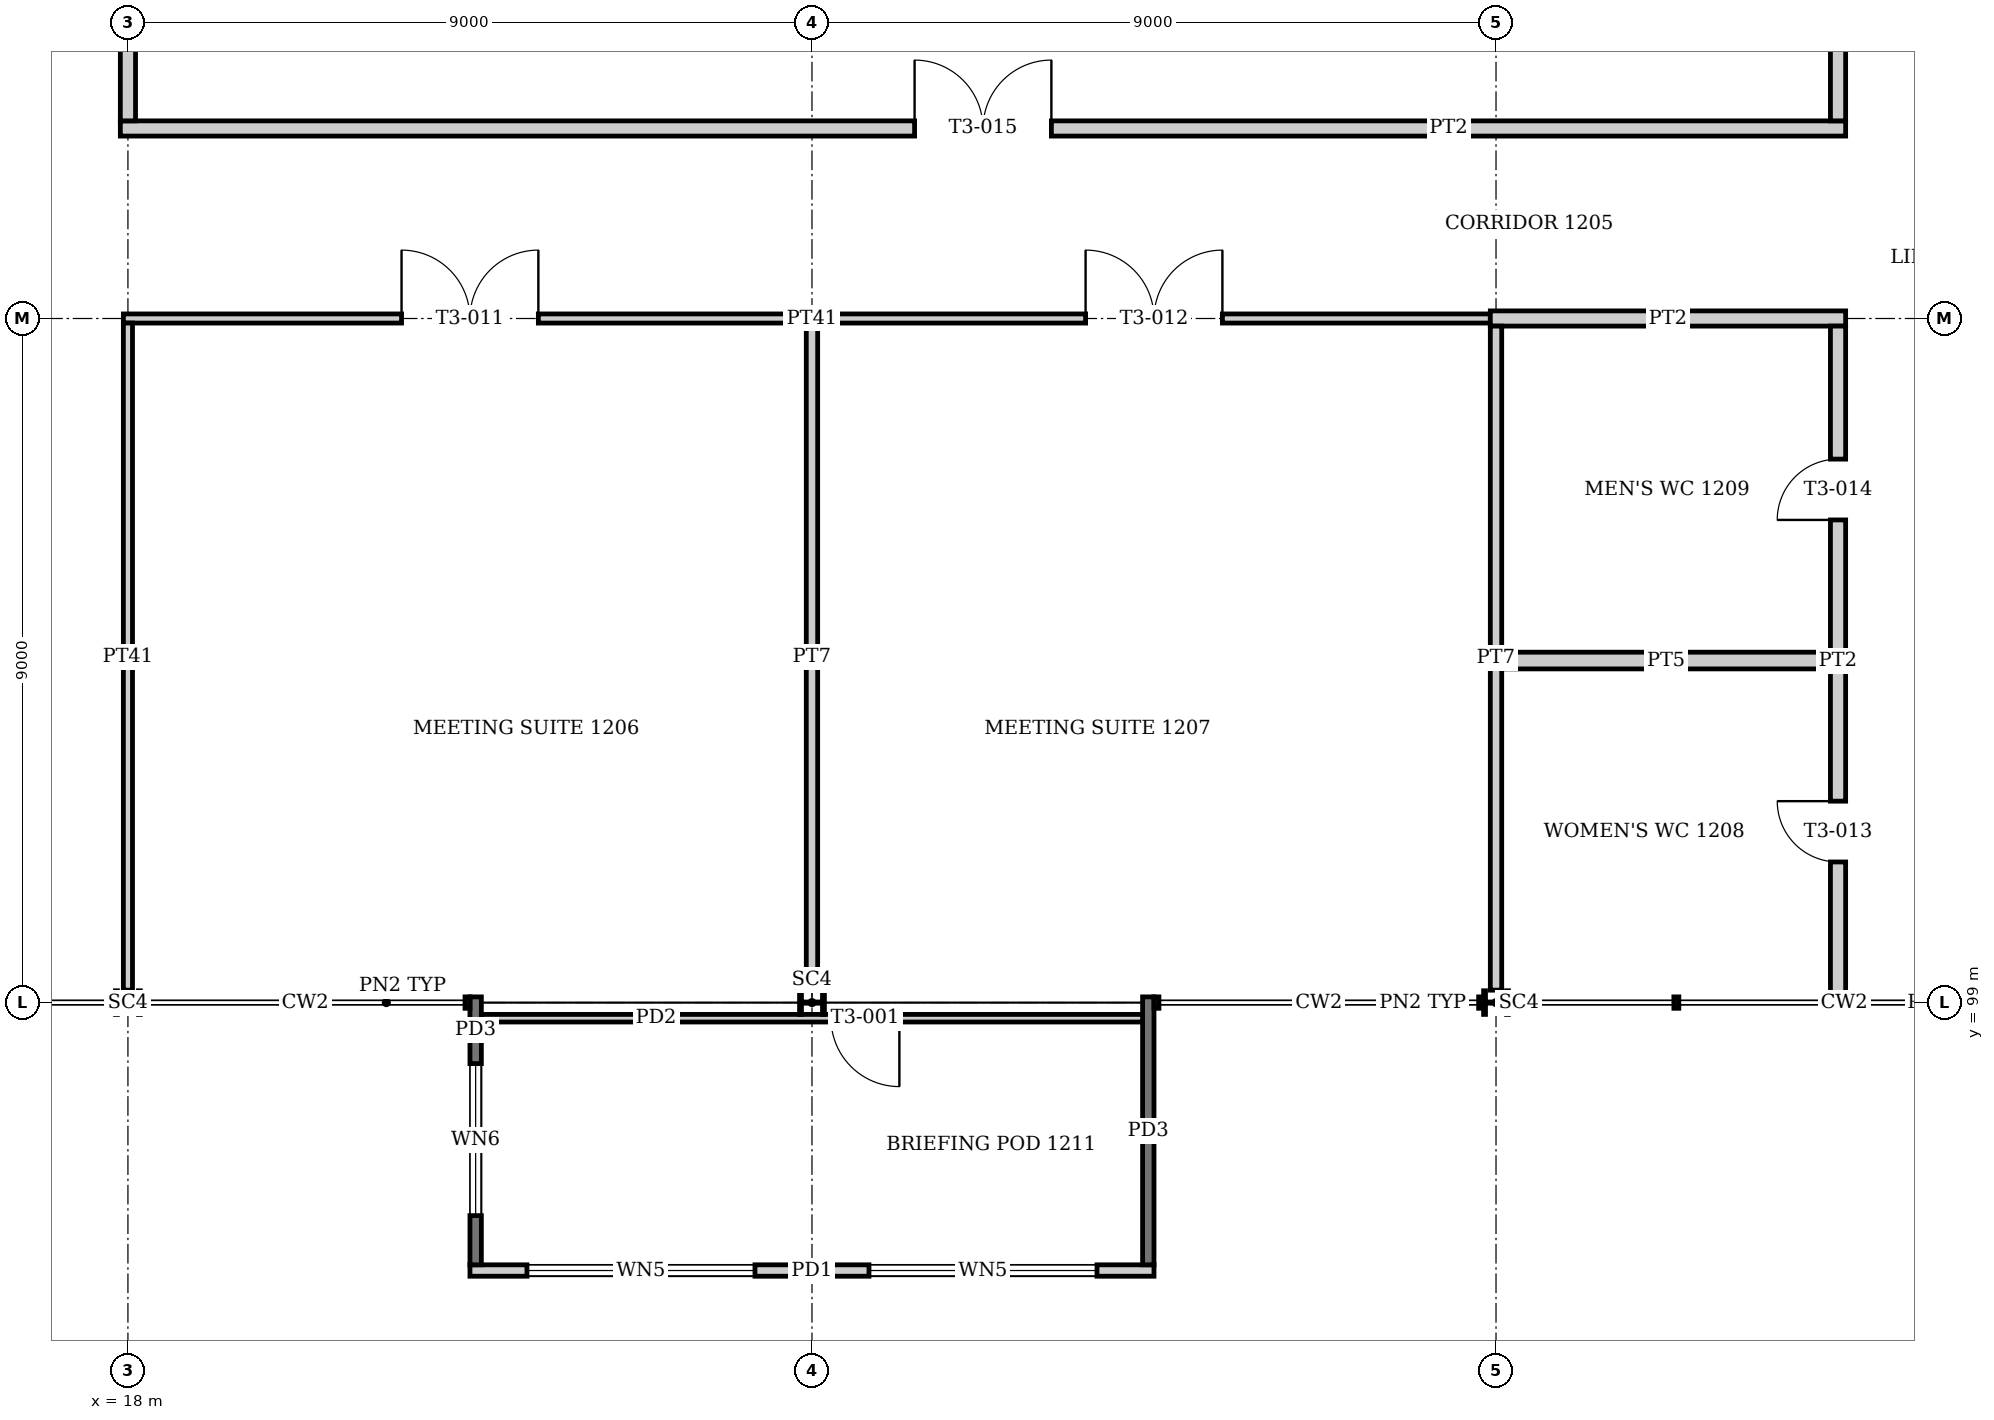
"""IFC4 building model, lengths in metres.
Left out: names, types, materials, properties, quantities, classifications, styles, units other than length and angle.
Written with IfcOpenShell. Run it as: python <this file> out.ifc"""

import sys

from ifc_helpers import new_model, si_unit, direction, frame, frame_2d, origin, origin_2d, place, context, subcontext, project, spatial, rectangle, i_section, extrude, element, fill, save


model = new_model("IFC4")
c1 = context("Model", 3, precision=1e-05, world=origin(), true_north=direction((0.0, 1.0)))
c2 = subcontext(c1, "Body", "Model", "MODEL_VIEW")
j1 = project(units=[si_unit("LENGTHUNIT", "METRE"), si_unit("PLANEANGLEUNIT", "RADIAN")], contexts=[c1])
p1 = place(None, origin())
s1 = spatial("IfcSite", under=j1, at=p1, CompositionType="ELEMENT")
p2 = place(p1, origin())
s2 = spatial("IfcBuilding", under=s1, at=p2, CompositionType="ELEMENT")
p3 = place(p2, frame((0.0, 0.0, 51.2)))
s3 = spatial("IfcBuildingStorey", under=s2, at=p3, CompositionType="ELEMENT", Elevation=51.2)
for number, where, z_axis, x_axis in (
    (1, (18.0, 99.0, 0.0), (0.0, 0.0, 1.0), (0.0, 1.0, 0.0)),
    (2, (27.0, 99.0, 0.0), (0.0, 0.0, 1.0), (0.0, 1.0, 0.0)),
    (3, (36.0, 99.0, 0.0), (0.0, 0.0, 1.0), (0.0, 1.0, 0.0)),
):
    element("IfcColumn", number, at=place(p3, frame(where, z_axis=z_axis, x_axis=x_axis)), inside=s3, PredefinedType="COLUMN", context=c2, shape_type="SweptSolid", body=[
        extrude(i_section(OverallWidth=0.311, OverallDepth=0.327, WebThickness=0.016, FlangeThickness=0.025, at=origin_2d()), origin(), (0.0, 0.0, 1.0), 4.0),
    ])
p4 = place(p3, frame((22.5, 95.475, 0.0), z_axis=(0.0, 0.0, 1.0), x_axis=(1.0, 0.0, 0.0)))
e4 = element("IfcWall", 4, at=p4, inside=s3, PredefinedType="SOLIDWALL", context=c2, shape_type="SweptSolid", body=[
    extrude(rectangle(XDim=9.0, YDim=0.15, at=frame_2d((4.5, 0.0))), origin(), (0.0, 0.0, 1.0), 2.6),
])
p5 = place(p4, frame((0.75, 0.0, 0.9)))
e5 = element("IfcOpeningElement", 5, at=p5, cuts=e4, PredefinedType="OPENING", context=c2, shape_type="SweptSolid", body=[
    extrude(rectangle(XDim=3.0, YDim=1.4, at=frame_2d((1.5, 0.7))), frame((0.0, 0.085, 0.0), z_axis=(0.0, -1.0, 0.0), x_axis=(1.0, 0.0, 0.0)), (0.0, 0.0, 1.0), 0.17),
])
p6 = place(p4, frame((5.25, 0.0, 0.9)))
e6 = element("IfcOpeningElement", 6, at=p6, cuts=e4, PredefinedType="OPENING", context=c2, shape_type="SweptSolid", body=[
    extrude(rectangle(XDim=3.0, YDim=1.4, at=frame_2d((1.5, 0.7))), frame((0.0, 0.085, 0.0), z_axis=(0.0, -1.0, 0.0), x_axis=(1.0, 0.0, 0.0)), (0.0, 0.0, 1.0), 0.17),
])
p7 = place(p3, frame((22.575, 95.55, -0.15), z_axis=(0.0, 0.0, 1.0), x_axis=(0.0, 1.0, 0.0)))
e7 = element("IfcWall", 7, at=p7, inside=s3, PredefinedType="SOLIDWALL", context=c2, shape_type="SweptSolid", body=[
    extrude(rectangle(XDim=3.525, YDim=0.15, at=frame_2d((1.762, 0.0))), origin(), (0.0, 0.0, 1.0), 2.75),
])
p8 = place(p7, frame((0.647, 0.0, 1.05)))
e8 = element("IfcOpeningElement", 8, at=p8, cuts=e7, PredefinedType="OPENING", context=c2, shape_type="SweptSolid", body=[
    extrude(rectangle(XDim=2.0, YDim=1.4, at=frame_2d((1.0, 0.7))), frame((0.0, 0.085, 0.0), z_axis=(0.0, -1.0, 0.0), x_axis=(1.0, 0.0, 0.0)), (0.0, 0.0, 1.0), 0.17),
])
p9 = place(p3, frame((31.425, 95.55, -0.15), z_axis=(0.0, 0.0, 1.0), x_axis=(0.0, 1.0, 0.0)))
e9 = element("IfcWall", 9, at=p9, inside=s3, PredefinedType="SOLIDWALL", context=c2, shape_type="SweptSolid", body=[
    extrude(rectangle(XDim=3.525, YDim=0.15, at=frame_2d((1.762, 0.0))), origin(), (0.0, 0.0, 1.0), 2.75),
])
p10 = place(p3, frame((22.65, 98.794, 0.0), z_axis=(0.0, 0.0, 1.0), x_axis=(1.0, 0.0, 0.0)))
e10 = element("IfcWall", 10, at=p10, inside=s3, PredefinedType="PARTITIONING", context=c2, shape_type="SweptSolid", body=[
    extrude(rectangle(XDim=8.7, YDim=0.1, at=frame_2d((4.35, 0.0))), origin(), (0.0, 0.0, 1.0), 2.6),
])
p11 = place(p10, frame((4.6, 0.0, 0.0)))
e11 = element("IfcOpeningElement", 11, at=p11, cuts=e10, PredefinedType="OPENING", context=c2, shape_type="SweptSolid", body=[
    extrude(rectangle(XDim=0.9, YDim=2.1, at=frame_2d((0.45, 1.05))), frame((0.0, 0.06, 0.0), z_axis=(0.0, -1.0, 0.0), x_axis=(1.0, 0.0, 0.0)), (0.0, 0.0, 1.0), 0.12),
])
p12 = place(p3, frame((36.075, 103.5, 0.0), z_axis=(0.0, 0.0, 1.0), x_axis=(1.0, 0.0, 0.0)))
e12 = element("IfcWall", 12, at=p12, inside=s3, PredefinedType="PLUMBINGWALL", context=c2, shape_type="SweptSolid", body=[
    extrude(rectangle(XDim=4.325, YDim=0.22, at=frame_2d((2.163, 0.0))), origin(), (0.0, 0.0, 1.0), 3.05),
])
p13 = place(p3, frame((17.94, 108.0, 0.0), z_axis=(0.0, 0.0, 1.0), x_axis=(1.0, 0.0, 0.0)))
e13 = element("IfcWall", 13, at=p13, inside=s3, PredefinedType="PARTITIONING", context=c2, shape_type="SweptSolid", body=[
    extrude(rectangle(XDim=17.985, YDim=0.12, at=frame_2d((8.993, 0.0))), origin(), (0.0, 0.0, 1.0), 3.05),
])
p14 = place(p13, frame((3.66, 0.0, 0.0)))
e14 = element("IfcOpeningElement", 14, at=p14, cuts=e13, PredefinedType="OPENING", context=c2, shape_type="SweptSolid", body=[
    extrude(rectangle(XDim=1.8, YDim=2.1, at=frame_2d((0.9, 1.05))), frame((0.0, 0.07, 0.0), z_axis=(0.0, -1.0, 0.0), x_axis=(1.0, 0.0, 0.0)), (0.0, 0.0, 1.0), 0.14),
])
p15 = place(p13, frame((12.66, 0.0, 0.0)))
e15 = element("IfcOpeningElement", 15, at=p15, cuts=e13, PredefinedType="OPENING", context=c2, shape_type="SweptSolid", body=[
    extrude(rectangle(XDim=1.8, YDim=2.1, at=frame_2d((0.9, 1.05))), frame((0.0, 0.07, 0.0), z_axis=(0.0, -1.0, 0.0), x_axis=(1.0, 0.0, 0.0)), (0.0, 0.0, 1.0), 0.14),
])
p16 = place(p3, frame((35.925, 108.0, 0.0), z_axis=(0.0, 0.0, 1.0), x_axis=(1.0, 0.0, 0.0)))
e16 = element("IfcWall", 16, at=p16, inside=s3, PredefinedType="PARTITIONING", context=c2, shape_type="SweptSolid", body=[
    extrude(rectangle(XDim=4.675, YDim=0.2, at=frame_2d((2.337, 0.0))), origin(), (0.0, 0.0, 1.0), 3.05),
])
p17 = place(p3, frame((17.9, 110.5, 0.0), z_axis=(0.0, 0.0, 1.0), x_axis=(1.0, 0.0, 0.0)))
e17 = element("IfcWall", 17, at=p17, inside=s3, PredefinedType="PARTITIONING", context=c2, shape_type="SweptSolid", body=[
    extrude(rectangle(XDim=22.7, YDim=0.2, at=frame_2d((11.35, 0.0))), origin(), (0.0, 0.0, 1.0), 3.05),
])
p18 = place(p17, frame((10.45, 0.0, 0.0)))
e18 = element("IfcOpeningElement", 18, at=p18, cuts=e17, PredefinedType="OPENING", context=c2, shape_type="SweptSolid", body=[
    extrude(rectangle(XDim=1.8, YDim=2.1, at=frame_2d((0.9, 1.05))), frame((0.0, 0.11, 0.0), z_axis=(0.0, -1.0, 0.0), x_axis=(1.0, 0.0, 0.0)), (0.0, 0.0, 1.0), 0.22),
])
p19 = place(p3, frame((18.0, 99.164, 0.0), z_axis=(0.0, 0.0, 1.0), x_axis=(0.0, 1.0, 0.0)))
e19 = element("IfcWall", 19, at=p19, inside=s3, PredefinedType="PARTITIONING", context=c2, shape_type="SweptSolid", body=[
    extrude(rectangle(XDim=8.776, YDim=0.12, at=frame_2d((4.388, 0.0))), origin(), (0.0, 0.0, 1.0), 3.05),
])
p20 = place(p3, frame((18.0, 110.6, 0.0), z_axis=(0.0, 0.0, 1.0), x_axis=(0.0, 1.0, 0.0)))
e20 = element("IfcWall", 20, at=p20, inside=s3, PredefinedType="PARTITIONING", context=c2, shape_type="SweptSolid", body=[
    extrude(rectangle(XDim=6.236, YDim=0.2, at=frame_2d((3.118, 0.0))), origin(), (0.0, 0.0, 1.0), 3.05),
])
p21 = place(p20, frame((3.25, 0.0, 0.0)))
e21 = element("IfcOpeningElement", 21, at=p21, cuts=e20, PredefinedType="OPENING", context=c2, shape_type="SweptSolid", body=[
    extrude(rectangle(XDim=1.8, YDim=2.1, at=frame_2d((0.9, 1.05))), frame((0.0, 0.11, 0.0), z_axis=(0.0, -1.0, 0.0), x_axis=(1.0, 0.0, 0.0)), (0.0, 0.0, 1.0), 0.22),
])
p22 = place(p3, frame((27.0, 99.164, 0.0), z_axis=(0.0, 0.0, 1.0), x_axis=(0.0, 1.0, 0.0)))
e22 = element("IfcWall", 22, at=p22, inside=s3, PredefinedType="PARTITIONING", context=c2, shape_type="SweptSolid", body=[
    extrude(rectangle(XDim=8.776, YDim=0.15, at=frame_2d((4.388, 0.0))), origin(), (0.0, 0.0, 1.0), 3.05),
])
p23 = place(p3, frame((36.0, 99.164, 0.0), z_axis=(0.0, 0.0, 1.0), x_axis=(0.0, 1.0, 0.0)))
e23 = element("IfcWall", 23, at=p23, inside=s3, PredefinedType="PARTITIONING", context=c2, shape_type="SweptSolid", body=[
    extrude(rectangle(XDim=8.736, YDim=0.15, at=frame_2d((4.368, 0.0))), origin(), (0.0, 0.0, 1.0), 3.05),
])
p24 = place(p3, frame((40.5, 99.075, 0.0), z_axis=(0.0, 0.0, 1.0), x_axis=(0.0, 1.0, 0.0)))
e24 = element("IfcWall", 24, at=p24, inside=s3, PredefinedType="PARTITIONING", context=c2, shape_type="SweptSolid", body=[
    extrude(rectangle(XDim=8.825, YDim=0.2, at=frame_2d((4.413, 0.0))), origin(), (0.0, 0.0, 1.0), 3.05),
])
p25 = place(p24, frame((1.775, 0.0, 0.0)))
e25 = element("IfcOpeningElement", 25, at=p25, cuts=e24, PredefinedType="OPENING", context=c2, shape_type="SweptSolid", body=[
    extrude(rectangle(XDim=0.8, YDim=2.1, at=frame_2d((0.4, 1.05))), frame((0.0, 0.11, 0.0), z_axis=(0.0, -1.0, 0.0), x_axis=(1.0, 0.0, 0.0)), (0.0, 0.0, 1.0), 0.22),
])
p26 = place(p24, frame((6.275, 0.0, 0.0)))
e26 = element("IfcOpeningElement", 26, at=p26, cuts=e24, PredefinedType="OPENING", context=c2, shape_type="SweptSolid", body=[
    extrude(rectangle(XDim=0.8, YDim=2.1, at=frame_2d((0.4, 1.05))), frame((0.0, 0.11, 0.0), z_axis=(0.0, -1.0, 0.0), x_axis=(1.0, 0.0, 0.0)), (0.0, 0.0, 1.0), 0.22),
])
p27 = place(p3, frame((40.5, 110.6, 0.0), z_axis=(0.0, 0.0, 1.0), x_axis=(0.0, 1.0, 0.0)))
e27 = element("IfcWall", 27, at=p27, inside=s3, PredefinedType="PARTITIONING", context=c2, shape_type="SweptSolid", body=[
    extrude(rectangle(XDim=6.31, YDim=0.2, at=frame_2d((3.155, 0.0))), origin(), (0.0, 0.0, 1.0), 3.05),
])
p28 = place(p5, origin())
e28 = element("IfcWindow", 28, at=p28, inside=s3, PartitioningType="SINGLE_PANEL", PredefinedType="WINDOW", context=c2, shape_type="SweptSolid", body=[
    extrude(rectangle(XDim=3.0, YDim=1.4, at=frame_2d((1.5, 0.7))), frame((0.0, 0.03, 0.0), z_axis=(0.0, -1.0, 0.0), x_axis=(1.0, 0.0, 0.0)), (0.0, 0.0, 1.0), 0.06),
])
fill(e5, e28)
p29 = place(p6, origin())
e29 = element("IfcWindow", 29, at=p29, inside=s3, PartitioningType="SINGLE_PANEL", PredefinedType="WINDOW", context=c2, shape_type="SweptSolid", body=[
    extrude(rectangle(XDim=3.0, YDim=1.4, at=frame_2d((1.5, 0.7))), frame((0.0, 0.03, 0.0), z_axis=(0.0, -1.0, 0.0), x_axis=(1.0, 0.0, 0.0)), (0.0, 0.0, 1.0), 0.06),
])
fill(e6, e29)
p30 = place(p8, origin())
e30 = element("IfcWindow", 30, at=p30, inside=s3, PartitioningType="SINGLE_PANEL", PredefinedType="WINDOW", context=c2, shape_type="SweptSolid", body=[
    extrude(rectangle(XDim=2.0, YDim=1.4, at=frame_2d((1.0, 0.7))), frame((0.0, 0.03, 0.0), z_axis=(0.0, -1.0, 0.0), x_axis=(1.0, 0.0, 0.0)), (0.0, 0.0, 1.0), 0.06),
])
fill(e8, e30)
p31 = place(p11, frame((0.9, 0.0, 0.0), z_axis=(0.0, 0.0, 1.0), x_axis=(-1.0, 0.0, 0.0)))
e31 = element("IfcDoor", 31, at=p31, inside=s3, OperationType="SINGLE_SWING_LEFT", PredefinedType="DOOR", context=c2, shape_type="SweptSolid", body=[
    extrude(rectangle(XDim=0.9, YDim=2.1, at=frame_2d((0.45, 1.05))), frame((0.0, 0.025, 0.0), z_axis=(0.0, -1.0, 0.0), x_axis=(1.0, 0.0, 0.0)), (0.0, 0.0, 1.0), 0.05),
])
fill(e11, e31)
p32 = place(p14, origin())
e32 = element("IfcDoor", 32, at=p32, inside=s3, OperationType="DOUBLE_DOOR_SINGLE_SWING", PredefinedType="DOOR", context=c2, shape_type="SweptSolid", body=[
    extrude(rectangle(XDim=1.8, YDim=2.1, at=frame_2d((0.9, 1.05))), frame((0.0, 0.025, 0.0), z_axis=(0.0, -1.0, 0.0), x_axis=(1.0, 0.0, 0.0)), (0.0, 0.0, 1.0), 0.05),
])
fill(e14, e32)
p33 = place(p15, origin())
e33 = element("IfcDoor", 33, at=p33, inside=s3, OperationType="DOUBLE_DOOR_SINGLE_SWING", PredefinedType="DOOR", context=c2, shape_type="SweptSolid", body=[
    extrude(rectangle(XDim=1.8, YDim=2.1, at=frame_2d((0.9, 1.05))), frame((0.0, 0.025, 0.0), z_axis=(0.0, -1.0, 0.0), x_axis=(1.0, 0.0, 0.0)), (0.0, 0.0, 1.0), 0.05),
])
fill(e15, e33)
p34 = place(p25, origin())
e34 = element("IfcDoor", 34, at=p34, inside=s3, OperationType="SINGLE_SWING_RIGHT", PredefinedType="DOOR", context=c2, shape_type="SweptSolid", body=[
    extrude(rectangle(XDim=0.8, YDim=2.1, at=frame_2d((0.4, 1.05))), frame((0.0, 0.025, 0.0), z_axis=(0.0, -1.0, 0.0), x_axis=(1.0, 0.0, 0.0)), (0.0, 0.0, 1.0), 0.05),
])
fill(e25, e34)
p35 = place(p26, origin())
e35 = element("IfcDoor", 35, at=p35, inside=s3, OperationType="SINGLE_SWING_LEFT", PredefinedType="DOOR", context=c2, shape_type="SweptSolid", body=[
    extrude(rectangle(XDim=0.8, YDim=2.1, at=frame_2d((0.4, 1.05))), frame((0.0, 0.025, 0.0), z_axis=(0.0, -1.0, 0.0), x_axis=(1.0, 0.0, 0.0)), (0.0, 0.0, 1.0), 0.05),
])
fill(e26, e35)
p36 = place(p18, origin())
e36 = element("IfcDoor", 36, at=p36, inside=s3, OperationType="DOUBLE_DOOR_SINGLE_SWING", PredefinedType="DOOR", context=c2, shape_type="SweptSolid", body=[
    extrude(rectangle(XDim=1.8, YDim=2.1, at=frame_2d((0.9, 1.05))), frame((0.0, 0.025, 0.0), z_axis=(0.0, -1.0, 0.0), x_axis=(1.0, 0.0, 0.0)), (0.0, 0.0, 1.0), 0.05),
])
fill(e18, e36)
save(model, sys.argv[1])
